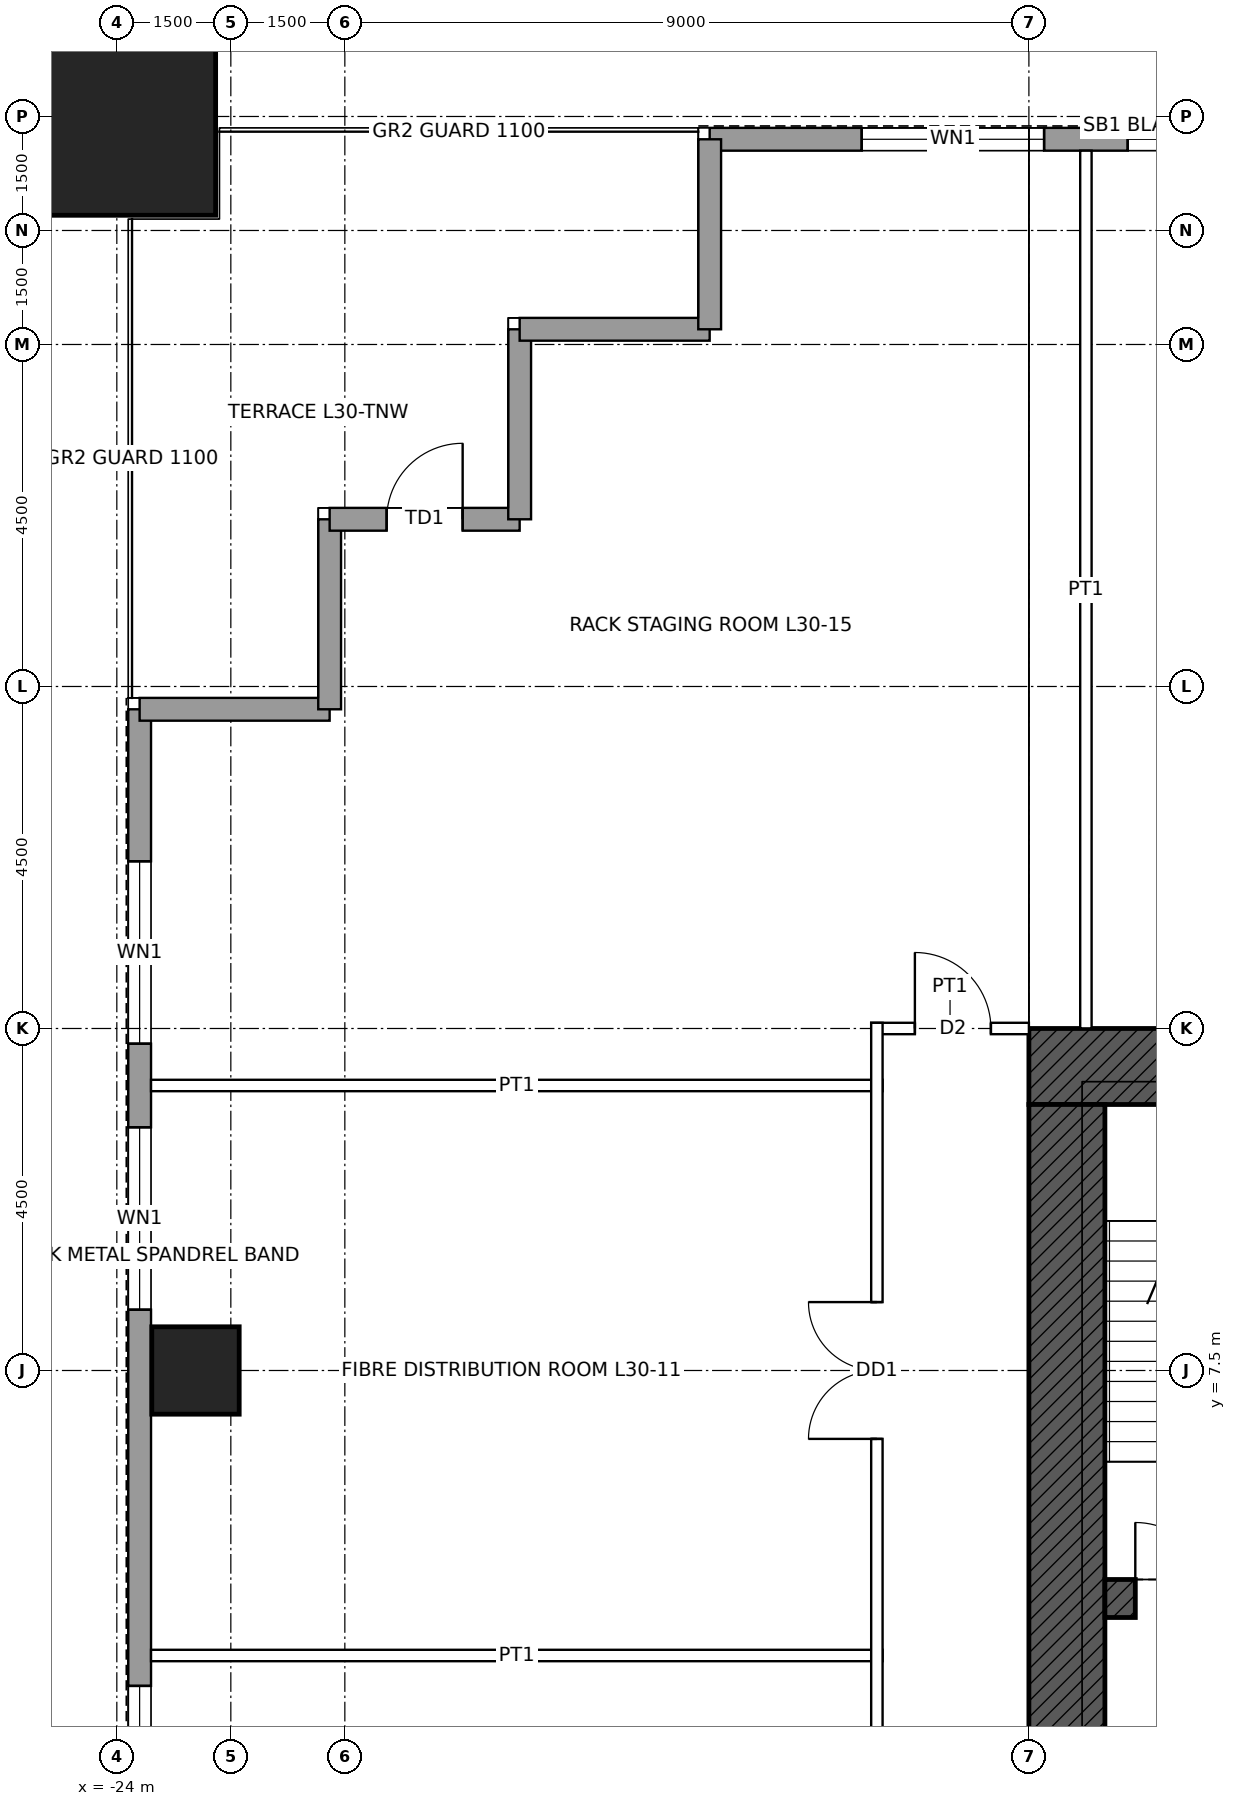
"""IFC4 building model, lengths in metres.
Left out: names, types, materials, properties, quantities, classifications, styles, units other than length and angle.
Written with IfcOpenShell. Run it as: python <this file> out.ifc"""

import sys

from ifc_helpers import new_model, si_unit, direction, frame, frame_2d, origin, origin_2d, place, context, subcontext, project, spatial, rectangle, hollow_rectangle, extrude, element, fill, save


model = new_model("IFC4")
c1 = context("Model", 3, precision=1e-05, world=origin(), true_north=direction((0.0, 1.0)))
c2 = subcontext(c1, "Body", "Model", "MODEL_VIEW")
j1 = project(units=[si_unit("LENGTHUNIT", "METRE"), si_unit("PLANEANGLEUNIT", "RADIAN")], contexts=[c1])
p1 = place(None, origin())
s1 = spatial("IfcSite", under=j1, at=p1, CompositionType="ELEMENT")
p2 = place(p1, origin())
s2 = spatial("IfcBuilding", under=s1, at=p2, CompositionType="ELEMENT")
p3 = place(p2, frame((0.0, 0.0, 149.4)))
s3 = spatial("IfcBuildingStorey", under=s2, at=p3, CompositionType="ELEMENT", Elevation=149.4)
p4 = place(p3, frame((-24.0, 24.0, 0.0), z_axis=(0.0, 0.0, 1.0), x_axis=(1.0, 0.0, 0.0)))
e1 = element("IfcColumn", 1, at=p4, inside=s3, PredefinedType="COLUMN", context=c2, shape_type="SweptSolid", body=[
    extrude(hollow_rectangle(XDim=2.6, YDim=2.6, WallThickness=0.13, at=origin_2d()), origin(), (0.0, 0.0, 1.0), 4.5),
])
p5 = place(p3, frame((-22.965, 7.5, 0.0), z_axis=(0.0, 0.0, 1.0), x_axis=(1.0, 0.0, 0.0)))
e2 = element("IfcColumn", 2, at=p5, inside=s3, PredefinedType="COLUMN", context=c2, shape_type="SweptSolid", body=[
    extrude(hollow_rectangle(XDim=1.15, YDim=1.15, WallThickness=0.075, at=origin_2d()), origin(), (0.0, 0.0, 1.0), 4.5),
])
p6 = place(p3, frame((-12.0, 11.5, 0.0), z_axis=(0.0, 0.0, 1.0), x_axis=(1.0, 0.0, 0.0)))
e3 = element("IfcWall", 3, at=p6, inside=s3, PredefinedType="SHEAR", context=c2, shape_type="SweptSolid", body=[
    extrude(rectangle(XDim=24.0, YDim=1.0, at=frame_2d((12.0, 0.0))), origin(), (0.0, 0.0, 1.0), 4.5),
])
p7 = place(p6, frame((6.25, 0.0, 0.0)))
e4 = element("IfcOpeningElement", 4, at=p7, cuts=e3, PredefinedType="OPENING", context=c2, shape_type="SweptSolid", body=[
    extrude(rectangle(XDim=1.0, YDim=2.4, at=frame_2d((0.5, 1.2))), frame((0.0, 0.51, 0.0), z_axis=(0.0, -1.0, 0.0), x_axis=(1.0, 0.0, 0.0)), (0.0, 0.0, 1.0), 1.02),
])
p8 = place(p6, frame((16.75, 0.0, 0.0)))
e5 = element("IfcOpeningElement", 5, at=p8, cuts=e3, PredefinedType="OPENING", context=c2, shape_type="SweptSolid", body=[
    extrude(rectangle(XDim=1.0, YDim=2.4, at=frame_2d((0.5, 1.2))), frame((0.0, 0.51, 0.0), z_axis=(0.0, -1.0, 0.0), x_axis=(1.0, 0.0, 0.0)), (0.0, 0.0, 1.0), 1.02),
])
p9 = place(p3, frame((-11.5, -11.0, 0.0), z_axis=(0.0, 0.0, 1.0), x_axis=(0.0, 1.0, 0.0)))
e6 = element("IfcWall", 6, at=p9, inside=s3, PredefinedType="SHEAR", context=c2, shape_type="SweptSolid", body=[
    extrude(rectangle(XDim=22.0, YDim=1.0, at=frame_2d((11.0, 0.0))), origin(), (0.0, 0.0, 1.0), 4.5),
])
p10 = place(p9, frame((10.5, 0.0, 0.0)))
e7 = element("IfcOpeningElement", 7, at=p10, cuts=e6, PredefinedType="OPENING", context=c2, shape_type="SweptSolid", body=[
    extrude(rectangle(XDim=1.0, YDim=2.4, at=frame_2d((0.5, 1.2))), frame((0.0, 0.51, 0.0), z_axis=(0.0, -1.0, 0.0), x_axis=(1.0, 0.0, 0.0)), (0.0, 0.0, 1.0), 1.02),
])
p11 = place(p3, frame((-11.0, 4.5, 0.0), z_axis=(0.0, 0.0, 1.0), x_axis=(1.0, 0.0, 0.0)))
e8 = element("IfcWall", 8, at=p11, inside=s3, PredefinedType="SHEAR", context=c2, shape_type="SweptSolid", body=[
    extrude(rectangle(XDim=22.0, YDim=0.5, at=frame_2d((11.0, 0.0))), origin(), (0.0, 0.0, 1.0), 4.5),
])
p12 = place(p11, frame((0.4, 0.0, 0.0)))
e9 = element("IfcOpeningElement", 9, at=p12, cuts=e8, PredefinedType="OPENING", context=c2, shape_type="SweptSolid", body=[
    extrude(rectangle(XDim=1.0, YDim=2.1, at=frame_2d((0.5, 1.05))), frame((0.0, 0.26, 0.0), z_axis=(0.0, -1.0, 0.0), x_axis=(1.0, 0.0, 0.0)), (0.0, 0.0, 1.0), 0.52),
])
p13 = place(p11, frame((20.6, 0.0, 0.0)))
e10 = element("IfcOpeningElement", 10, at=p13, cuts=e8, PredefinedType="OPENING", context=c2, shape_type="SweptSolid", body=[
    extrude(rectangle(XDim=1.0, YDim=2.1, at=frame_2d((0.5, 1.05))), frame((0.0, 0.26, 0.0), z_axis=(0.0, -1.0, 0.0), x_axis=(1.0, 0.0, 0.0)), (0.0, 0.0, 1.0), 0.52),
])
p14 = place(p3, frame((-16.2, 23.7, 0.0), z_axis=(0.0, 0.0, 1.0), x_axis=(1.0, 0.0, 0.0)))
e11 = element("IfcWall", 11, at=p14, inside=s3, PredefinedType="SOLIDWALL", context=c2, shape_type="SweptSolid", body=[
    extrude(rectangle(XDim=32.4, YDim=0.3, at=frame_2d((16.2, 0.0))), origin(), (0.0, 0.0, 1.0), 4.3),
])
p15 = place(p14, frame((2.0, 0.0, 1.0)))
e12 = element("IfcOpeningElement", 12, at=p15, cuts=e11, PredefinedType="OPENING", context=c2, shape_type="SweptSolid", body=[
    extrude(rectangle(XDim=2.4, YDim=1.2, at=frame_2d((1.2, 0.6))), frame((0.0, 0.16, 0.0), z_axis=(0.0, -1.0, 0.0), x_axis=(1.0, 0.0, 0.0)), (0.0, 0.0, 1.0), 0.32),
])
p16 = place(p14, frame((5.5, 0.0, 1.0)))
e13 = element("IfcOpeningElement", 13, at=p16, cuts=e11, PredefinedType="OPENING", context=c2, shape_type="SweptSolid", body=[
    extrude(rectangle(XDim=2.4, YDim=1.2, at=frame_2d((1.2, 0.6))), frame((0.0, 0.16, 0.0), z_axis=(0.0, -1.0, 0.0), x_axis=(1.0, 0.0, 0.0)), (0.0, 0.0, 1.0), 0.32),
])
p17 = place(p14, frame((11.8, 0.0, 1.0)))
e14 = element("IfcOpeningElement", 14, at=p17, cuts=e11, PredefinedType="OPENING", context=c2, shape_type="SweptSolid", body=[
    extrude(rectangle(XDim=1.8, YDim=1.2, at=frame_2d((0.9, 0.6))), frame((0.0, 0.16, 0.0), z_axis=(0.0, -1.0, 0.0), x_axis=(1.0, 0.0, 0.0)), (0.0, 0.0, 1.0), 0.32),
])
p18 = place(p14, frame((13.9, 0.0, 1.0)))
e15 = element("IfcOpeningElement", 15, at=p18, cuts=e11, PredefinedType="OPENING", context=c2, shape_type="SweptSolid", body=[
    extrude(rectangle(XDim=1.8, YDim=1.2, at=frame_2d((0.9, 0.6))), frame((0.0, 0.16, 0.0), z_axis=(0.0, -1.0, 0.0), x_axis=(1.0, 0.0, 0.0)), (0.0, 0.0, 1.0), 0.32),
])
p19 = place(p14, frame((16.1, 0.0, 1.0)))
e16 = element("IfcOpeningElement", 16, at=p19, cuts=e11, PredefinedType="OPENING", context=c2, shape_type="SweptSolid", body=[
    extrude(rectangle(XDim=2.4, YDim=1.2, at=frame_2d((1.2, 0.6))), frame((0.0, 0.16, 0.0), z_axis=(0.0, -1.0, 0.0), x_axis=(1.0, 0.0, 0.0)), (0.0, 0.0, 1.0), 0.32),
])
p20 = place(p14, frame((18.8, 0.0, 1.0)))
e17 = element("IfcOpeningElement", 17, at=p20, cuts=e11, PredefinedType="OPENING", context=c2, shape_type="SweptSolid", body=[
    extrude(rectangle(XDim=1.8, YDim=1.2, at=frame_2d((0.9, 0.6))), frame((0.0, 0.16, 0.0), z_axis=(0.0, -1.0, 0.0), x_axis=(1.0, 0.0, 0.0)), (0.0, 0.0, 1.0), 0.32),
])
p21 = place(p14, frame((24.5, 0.0, 1.0)))
e18 = element("IfcOpeningElement", 18, at=p21, cuts=e11, PredefinedType="OPENING", context=c2, shape_type="SweptSolid", body=[
    extrude(rectangle(XDim=2.4, YDim=1.2, at=frame_2d((1.2, 0.6))), frame((0.0, 0.16, 0.0), z_axis=(0.0, -1.0, 0.0), x_axis=(1.0, 0.0, 0.0)), (0.0, 0.0, 1.0), 0.32),
])
p22 = place(p14, frame((28.0, 0.0, 1.0)))
e19 = element("IfcOpeningElement", 19, at=p22, cuts=e11, PredefinedType="OPENING", context=c2, shape_type="SweptSolid", body=[
    extrude(rectangle(XDim=2.4, YDim=1.2, at=frame_2d((1.2, 0.6))), frame((0.0, 0.16, 0.0), z_axis=(0.0, -1.0, 0.0), x_axis=(1.0, 0.0, 0.0)), (0.0, 0.0, 1.0), 0.32),
])
p23 = place(p3, frame((-23.7, -16.2, 0.0), z_axis=(0.0, 0.0, 1.0), x_axis=(0.0, 1.0, 0.0)))
e20 = element("IfcWall", 20, at=p23, inside=s3, PredefinedType="SOLIDWALL", context=c2, shape_type="SweptSolid", body=[
    extrude(rectangle(XDim=32.4, YDim=0.3, at=frame_2d((16.2, 0.0))), origin(), (0.0, 0.0, 1.0), 4.3),
])
p24 = place(p23, frame((0.65, 0.0, 1.0)))
e21 = element("IfcOpeningElement", 21, at=p24, cuts=e20, PredefinedType="OPENING", context=c2, shape_type="SweptSolid", body=[
    extrude(rectangle(XDim=1.8, YDim=1.2, at=frame_2d((0.9, 0.6))), frame((0.0, 0.16, 0.0), z_axis=(0.0, -1.0, 0.0), x_axis=(1.0, 0.0, 0.0)), (0.0, 0.0, 1.0), 0.32),
])
p25 = place(p23, frame((2.75, 0.0, 1.0)))
e22 = element("IfcOpeningElement", 22, at=p25, cuts=e20, PredefinedType="OPENING", context=c2, shape_type="SweptSolid", body=[
    extrude(rectangle(XDim=1.8, YDim=1.2, at=frame_2d((0.9, 0.6))), frame((0.0, 0.16, 0.0), z_axis=(0.0, -1.0, 0.0), x_axis=(1.0, 0.0, 0.0)), (0.0, 0.0, 1.0), 0.32),
])
p26 = place(p23, frame((6.75, 0.0, 1.0)))
e23 = element("IfcOpeningElement", 23, at=p26, cuts=e20, PredefinedType="OPENING", context=c2, shape_type="SweptSolid", body=[
    extrude(rectangle(XDim=2.4, YDim=1.2, at=frame_2d((1.2, 0.6))), frame((0.0, 0.16, 0.0), z_axis=(0.0, -1.0, 0.0), x_axis=(1.0, 0.0, 0.0)), (0.0, 0.0, 1.0), 0.32),
])
p27 = place(p23, frame((12.95, 0.0, 1.0)))
e24 = element("IfcOpeningElement", 24, at=p27, cuts=e20, PredefinedType="OPENING", context=c2, shape_type="SweptSolid", body=[
    extrude(rectangle(XDim=2.4, YDim=1.2, at=frame_2d((1.2, 0.6))), frame((0.0, 0.16, 0.0), z_axis=(0.0, -1.0, 0.0), x_axis=(1.0, 0.0, 0.0)), (0.0, 0.0, 1.0), 0.32),
])
p28 = place(p23, frame((15.65, 0.0, 1.0)))
e25 = element("IfcOpeningElement", 25, at=p28, cuts=e20, PredefinedType="OPENING", context=c2, shape_type="SweptSolid", body=[
    extrude(rectangle(XDim=1.8, YDim=1.2, at=frame_2d((0.9, 0.6))), frame((0.0, 0.16, 0.0), z_axis=(0.0, -1.0, 0.0), x_axis=(1.0, 0.0, 0.0)), (0.0, 0.0, 1.0), 0.32),
])
p29 = place(p23, frame((17.75, 0.0, 1.0)))
e26 = element("IfcOpeningElement", 26, at=p29, cuts=e20, PredefinedType="OPENING", context=c2, shape_type="SweptSolid", body=[
    extrude(rectangle(XDim=1.8, YDim=1.2, at=frame_2d((0.9, 0.6))), frame((0.0, 0.16, 0.0), z_axis=(0.0, -1.0, 0.0), x_axis=(1.0, 0.0, 0.0)), (0.0, 0.0, 1.0), 0.32),
])
p30 = place(p23, frame((24.5, 0.0, 1.0)))
e27 = element("IfcOpeningElement", 27, at=p30, cuts=e20, PredefinedType="OPENING", context=c2, shape_type="SweptSolid", body=[
    extrude(rectangle(XDim=2.4, YDim=1.2, at=frame_2d((1.2, 0.6))), frame((0.0, 0.16, 0.0), z_axis=(0.0, -1.0, 0.0), x_axis=(1.0, 0.0, 0.0)), (0.0, 0.0, 1.0), 0.32),
])
p31 = place(p23, frame((28.0, 0.0, 1.0)))
e28 = element("IfcOpeningElement", 28, at=p31, cuts=e20, PredefinedType="OPENING", context=c2, shape_type="SweptSolid", body=[
    extrude(rectangle(XDim=2.4, YDim=1.2, at=frame_2d((1.2, 0.6))), frame((0.0, 0.16, 0.0), z_axis=(0.0, -1.0, 0.0), x_axis=(1.0, 0.0, 0.0)), (0.0, 0.0, 1.0), 0.32),
])
for number, where, z_axis, x_axis in (
    (29, (-23.7, 16.2, 0.0), (0.0, 0.0, 1.0), (1.0, 0.0, 0.0)),
    (30, (-21.2, 16.2, 0.0), (0.0, 0.0, 1.0), (0.0, 1.0, 0.0)),
):
    element("IfcWall", number, at=place(p3, frame(where, z_axis=z_axis, x_axis=x_axis)), inside=s3, PredefinedType="SOLIDWALL", context=c2, shape_type="SweptSolid", body=[
        extrude(rectangle(XDim=2.5, YDim=0.3, at=frame_2d((1.25, 0.0))), origin(), (0.0, 0.0, 1.0), 4.3),
    ])
p32 = place(p3, frame((-21.2, 18.7, 0.0), z_axis=(0.0, 0.0, 1.0), x_axis=(1.0, 0.0, 0.0)))
e31 = element("IfcWall", 31, at=p32, inside=s3, PredefinedType="SOLIDWALL", context=c2, shape_type="SweptSolid", body=[
    extrude(rectangle(XDim=2.5, YDim=0.3, at=frame_2d((1.25, 0.0))), origin(), (0.0, 0.0, 1.0), 4.3),
])
p33 = place(p32, frame((0.75, 0.0, 0.0)))
e32 = element("IfcOpeningElement", 32, at=p33, cuts=e31, PredefinedType="OPENING", context=c2, shape_type="SweptSolid", body=[
    extrude(rectangle(XDim=1.0, YDim=2.4, at=frame_2d((0.5, 1.2))), frame((0.0, 0.16, 0.0), z_axis=(0.0, -1.0, 0.0), x_axis=(1.0, 0.0, 0.0)), (0.0, 0.0, 1.0), 0.32),
])
for number, where, z_axis, x_axis in (
    (33, (-18.7, 18.7, 0.0), (0.0, 0.0, 1.0), (0.0, 1.0, 0.0)),
    (34, (-18.7, 21.2, 0.0), (0.0, 0.0, 1.0), (1.0, 0.0, 0.0)),
    (35, (-16.2, 21.2, 0.0), (0.0, 0.0, 1.0), (0.0, 1.0, 0.0)),
):
    element("IfcWall", number, at=place(p3, frame(where, z_axis=z_axis, x_axis=x_axis)), inside=s3, PredefinedType="SOLIDWALL", context=c2, shape_type="SweptSolid", body=[
        extrude(rectangle(XDim=2.5, YDim=0.3, at=frame_2d((1.25, 0.0))), origin(), (0.0, 0.0, 1.0), 4.3),
    ])
for number, where, z_axis, x_axis in (
    (36, (-23.55, 3.75, 0.0), (0.0, 0.0, 1.0), (1.0, 0.0, 0.0)),
    (37, (-23.55, 11.25, 0.0), (0.0, 0.0, 1.0), (1.0, 0.0, 0.0)),
):
    element("IfcWall", number, at=place(p3, frame(where, z_axis=z_axis, x_axis=x_axis)), inside=s3, PredefinedType="PARTITIONING", context=c2, shape_type="SweptSolid", body=[
        extrude(rectangle(XDim=9.625, YDim=0.15, at=frame_2d((4.812, 0.0))), origin(), (0.0, 0.0, 1.0), 3.431),
    ])
p34 = place(p3, frame((-14.075, 12.0, 0.0), z_axis=(0.0, 0.0, 1.0), x_axis=(1.0, 0.0, 0.0)))
e38 = element("IfcWall", 38, at=p34, inside=s3, PredefinedType="PARTITIONING", context=c2, shape_type="SweptSolid", body=[
    extrude(rectangle(XDim=2.075, YDim=0.15, at=frame_2d((1.038, 0.0))), origin(), (0.0, 0.0, 1.0), 4.3),
])
p35 = place(p34, frame((0.575, 0.0, 0.0)))
e39 = element("IfcOpeningElement", 39, at=p35, cuts=e38, PredefinedType="OPENING", context=c2, shape_type="SweptSolid", body=[
    extrude(rectangle(XDim=1.0, YDim=2.1, at=frame_2d((0.5, 1.05))), frame((0.0, 0.085, 0.0), z_axis=(0.0, -1.0, 0.0), x_axis=(1.0, 0.0, 0.0)), (0.0, 0.0, 1.0), 0.17),
])
p36 = place(p3, frame((-14.0, -14.075, 0.0), z_axis=(0.0, 0.0, 1.0), x_axis=(0.0, 1.0, 0.0)))
e40 = element("IfcWall", 40, at=p36, inside=s3, PredefinedType="PARTITIONING", context=c2, shape_type="SweptSolid", body=[
    extrude(rectangle(XDim=26.15, YDim=0.15, at=frame_2d((13.075, 0.0))), origin(), (0.0, 0.0, 1.0), 4.3),
])
p37 = place(p36, frame((5.675, 0.0, 0.0)))
e41 = element("IfcOpeningElement", 41, at=p37, cuts=e40, PredefinedType="OPENING", context=c2, shape_type="SweptSolid", body=[
    extrude(rectangle(XDim=1.8, YDim=2.4, at=frame_2d((0.9, 1.2))), frame((0.0, 0.085, 0.0), z_axis=(0.0, -1.0, 0.0), x_axis=(1.0, 0.0, 0.0)), (0.0, 0.0, 1.0), 0.17),
])
p38 = place(p36, frame((13.175, 0.0, 0.0)))
e42 = element("IfcOpeningElement", 42, at=p38, cuts=e40, PredefinedType="OPENING", context=c2, shape_type="SweptSolid", body=[
    extrude(rectangle(XDim=1.8, YDim=2.4, at=frame_2d((0.9, 1.2))), frame((0.0, 0.085, 0.0), z_axis=(0.0, -1.0, 0.0), x_axis=(1.0, 0.0, 0.0)), (0.0, 0.0, 1.0), 0.17),
])
p39 = place(p36, frame((20.675, 0.0, 0.0)))
e43 = element("IfcOpeningElement", 43, at=p39, cuts=e40, PredefinedType="OPENING", context=c2, shape_type="SweptSolid", body=[
    extrude(rectangle(XDim=1.8, YDim=2.4, at=frame_2d((0.9, 1.2))), frame((0.0, 0.085, 0.0), z_axis=(0.0, -1.0, 0.0), x_axis=(1.0, 0.0, 0.0)), (0.0, 0.0, 1.0), 0.17),
])
p40 = place(p3, frame((-11.25, 12.0, 0.0), z_axis=(0.0, 0.0, 1.0), x_axis=(0.0, 1.0, 0.0)))
e44 = element("IfcWall", 44, at=p40, inside=s3, PredefinedType="PARTITIONING", context=c2, shape_type="SweptSolid", body=[
    extrude(rectangle(XDim=11.55, YDim=0.15, at=frame_2d((5.775, 0.0))), origin(), (0.0, 0.0, 1.0), 3.431),
])
p41 = place(p15, origin())
e45 = element("IfcWindow", 45, at=p41, inside=s3, PartitioningType="SINGLE_PANEL", PredefinedType="WINDOW", context=c2, shape_type="SweptSolid", body=[
    extrude(rectangle(XDim=2.4, YDim=1.2, at=frame_2d((1.2, 0.6))), frame((0.0, 0.03, 0.0), z_axis=(0.0, -1.0, 0.0), x_axis=(1.0, 0.0, 0.0)), (0.0, 0.0, 1.0), 0.06),
])
fill(e12, e45)
p42 = place(p16, origin())
e46 = element("IfcWindow", 46, at=p42, inside=s3, PartitioningType="SINGLE_PANEL", PredefinedType="WINDOW", context=c2, shape_type="SweptSolid", body=[
    extrude(rectangle(XDim=2.4, YDim=1.2, at=frame_2d((1.2, 0.6))), frame((0.0, 0.03, 0.0), z_axis=(0.0, -1.0, 0.0), x_axis=(1.0, 0.0, 0.0)), (0.0, 0.0, 1.0), 0.06),
])
fill(e13, e46)
p43 = place(p29, origin())
e47 = element("IfcWindow", 47, at=p43, inside=s3, PartitioningType="SINGLE_PANEL", PredefinedType="WINDOW", context=c2, shape_type="SweptSolid", body=[
    extrude(rectangle(XDim=1.8, YDim=1.2, at=frame_2d((0.9, 0.6))), frame((0.0, 0.03, 0.0), z_axis=(0.0, -1.0, 0.0), x_axis=(1.0, 0.0, 0.0)), (0.0, 0.0, 1.0), 0.06),
])
fill(e26, e47)
p44 = place(p30, origin())
e48 = element("IfcWindow", 48, at=p44, inside=s3, PartitioningType="SINGLE_PANEL", PredefinedType="WINDOW", context=c2, shape_type="SweptSolid", body=[
    extrude(rectangle(XDim=2.4, YDim=1.2, at=frame_2d((1.2, 0.6))), frame((0.0, 0.03, 0.0), z_axis=(0.0, -1.0, 0.0), x_axis=(1.0, 0.0, 0.0)), (0.0, 0.0, 1.0), 0.06),
])
fill(e27, e48)
p45 = place(p31, origin())
e49 = element("IfcWindow", 49, at=p45, inside=s3, PartitioningType="SINGLE_PANEL", PredefinedType="WINDOW", context=c2, shape_type="SweptSolid", body=[
    extrude(rectangle(XDim=2.4, YDim=1.2, at=frame_2d((1.2, 0.6))), frame((0.0, 0.03, 0.0), z_axis=(0.0, -1.0, 0.0), x_axis=(1.0, 0.0, 0.0)), (0.0, 0.0, 1.0), 0.06),
])
fill(e28, e49)
p46 = place(p33, origin())
e50 = element("IfcDoor", 50, at=p46, inside=s3, OperationType="SINGLE_SWING_RIGHT", PredefinedType="DOOR", context=c2, shape_type="SweptSolid", body=[
    extrude(rectangle(XDim=1.0, YDim=2.4, at=frame_2d((0.5, 1.2))), frame((0.0, 0.025, 0.0), z_axis=(0.0, -1.0, 0.0), x_axis=(1.0, 0.0, 0.0)), (0.0, 0.0, 1.0), 0.05),
])
fill(e32, e50)
p47 = place(p12, origin())
e51 = element("IfcDoor", 51, at=p47, inside=s3, OperationType="SINGLE_SWING_LEFT", PredefinedType="DOOR", context=c2, shape_type="SweptSolid", body=[
    extrude(rectangle(XDim=1.0, YDim=2.1, at=frame_2d((0.5, 1.05))), frame((0.0, 0.025, 0.0), z_axis=(0.0, -1.0, 0.0), x_axis=(1.0, 0.0, 0.0)), (0.0, 0.0, 1.0), 0.05),
])
fill(e9, e51)
p48 = place(p39, origin())
e52 = element("IfcDoor", 52, at=p48, inside=s3, OperationType="DOUBLE_DOOR_SINGLE_SWING", PredefinedType="DOOR", context=c2, shape_type="SweptSolid", body=[
    extrude(rectangle(XDim=1.8, YDim=2.4, at=frame_2d((0.9, 1.2))), frame((0.0, 0.025, 0.0), z_axis=(0.0, -1.0, 0.0), x_axis=(1.0, 0.0, 0.0)), (0.0, 0.0, 1.0), 0.05),
])
fill(e43, e52)
p49 = place(p35, origin())
e53 = element("IfcDoor", 53, at=p49, inside=s3, OperationType="SINGLE_SWING_LEFT", PredefinedType="DOOR", context=c2, shape_type="SweptSolid", body=[
    extrude(rectangle(XDim=1.0, YDim=2.1, at=frame_2d((0.5, 1.05))), frame((0.0, 0.025, 0.0), z_axis=(0.0, -1.0, 0.0), x_axis=(1.0, 0.0, 0.0)), (0.0, 0.0, 1.0), 0.05),
])
fill(e39, e53)
save(model, sys.argv[1])
